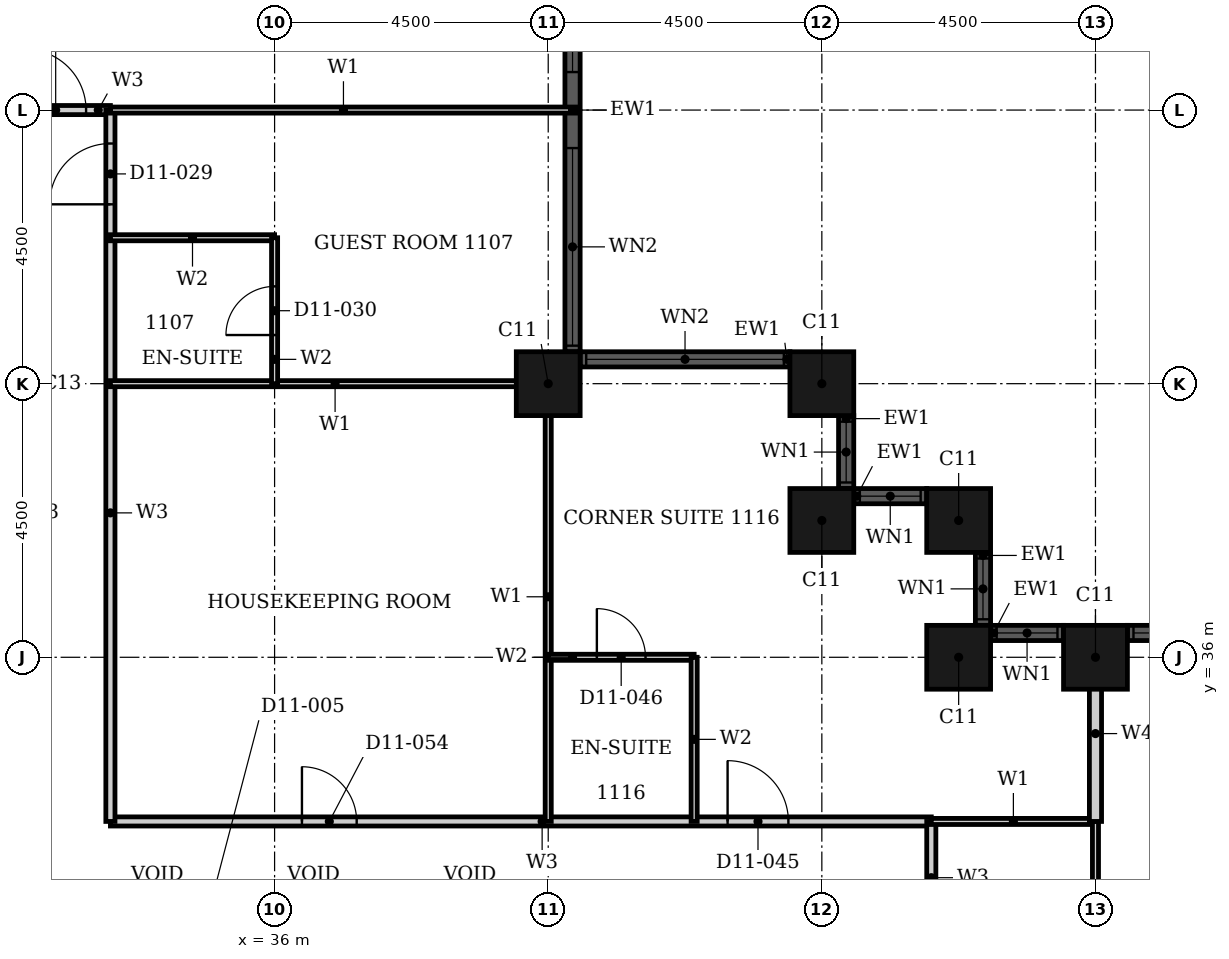
"""IFC4 building model, lengths in metres.
Left out: names, types, materials, properties, quantities, classifications, styles, units other than length and angle.
Written with IfcOpenShell. Run it as: python <this file> out.ifc"""

import sys

from ifc_helpers import new_model, si_unit, direction, frame, frame_2d, origin, origin_2d, place, context, subcontext, project, spatial, rectangle, hollow_rectangle, extrude, element, fill, save


model = new_model("IFC4")
c1 = context("Model", 3, precision=1e-05, world=origin(), true_north=direction((0.0, 1.0)))
c2 = subcontext(c1, "Body", "Model", "MODEL_VIEW")
j1 = project(units=[si_unit("LENGTHUNIT", "METRE"), si_unit("PLANEANGLEUNIT", "RADIAN")], contexts=[c1])
p1 = place(None, origin())
s1 = spatial("IfcSite", under=j1, at=p1, CompositionType="ELEMENT")
p2 = place(p1, origin())
s2 = spatial("IfcBuilding", under=s1, at=p2, CompositionType="ELEMENT")
p3 = place(p2, frame((0.0, 0.0, 52.8)))
s3 = spatial("IfcBuildingStorey", under=s2, at=p3, CompositionType="ELEMENT", Elevation=52.8)
for number, where, z_axis, x_axis in (
    (1, (49.5, 36.0, 0.0), (0.0, 0.0, 1.0), (1.0, 0.0, 0.0)),
    (2, (47.25, 36.0, 0.0), (0.0, 0.0, 1.0), (1.0, 0.0, 0.0)),
    (3, (47.25, 38.25, 0.0), (0.0, 0.0, 1.0), (1.0, 0.0, 0.0)),
    (4, (45.0, 38.25, 0.0), (0.0, 0.0, 1.0), (1.0, 0.0, 0.0)),
    (5, (45.0, 40.5, 0.0), (0.0, 0.0, 1.0), (1.0, 0.0, 0.0)),
    (6, (40.5, 40.5, 0.0), (0.0, 0.0, 1.0), (1.0, 0.0, 0.0)),
):
    element("IfcColumn", number, at=place(p3, frame(where, z_axis=z_axis, x_axis=x_axis)), inside=s3, PredefinedType="COLUMN", context=c2, shape_type="SweptSolid", body=[
        extrude(hollow_rectangle(XDim=1.05, YDim=1.05, WallThickness=0.034, at=origin_2d()), origin(), (0.0, 0.0, 1.0), 3.6),
    ])
p4 = place(p3, frame((57.975, 36.4, 0.0), z_axis=(0.0, 0.0, 1.0), x_axis=(-1.0, 0.0, 0.0)))
e7 = element("IfcWall", 7, at=p4, inside=s3, PredefinedType="SOLIDWALL", context=c2, shape_type="SweptSolid", body=[
    extrude(rectangle(XDim=7.95, YDim=0.25, at=frame_2d((3.975, 0.0))), origin(), (0.0, 0.0, 1.0), 3.6),
])
p5 = place(p4, frame((0.1, 0.0, 0.9)))
e8 = element("IfcOpeningElement", 8, at=p5, cuts=e7, PredefinedType="OPENING", context=c2, shape_type="SweptSolid", body=[
    extrude(rectangle(XDim=3.25, YDim=2.08, at=frame_2d((1.625, 1.04))), frame((0.0, 0.135, 0.0), z_axis=(0.0, -1.0, 0.0), x_axis=(1.0, 0.0, 0.0)), (0.0, 0.0, 1.0), 0.27),
])
p6 = place(p4, frame((4.6, 0.0, 0.9)))
e9 = element("IfcOpeningElement", 9, at=p6, cuts=e7, PredefinedType="OPENING", context=c2, shape_type="SweptSolid", body=[
    extrude(rectangle(XDim=3.25, YDim=2.08, at=frame_2d((1.625, 1.04))), frame((0.0, 0.135, 0.0), z_axis=(0.0, -1.0, 0.0), x_axis=(1.0, 0.0, 0.0)), (0.0, 0.0, 1.0), 0.27),
])
p7 = place(p3, frame((48.975, 36.4, 0.0), z_axis=(0.0, 0.0, 1.0), x_axis=(-1.0, 0.0, 0.0)))
e10 = element("IfcWall", 10, at=p7, inside=s3, PredefinedType="SOLIDWALL", context=c2, shape_type="SweptSolid", body=[
    extrude(rectangle(XDim=1.2, YDim=0.25, at=frame_2d((0.6, 0.0))), origin(), (0.0, 0.0, 1.0), 3.6),
])
p8 = place(p7, frame((0.1, 0.0, 0.9)))
e11 = element("IfcOpeningElement", 11, at=p8, cuts=e10, PredefinedType="OPENING", context=c2, shape_type="SweptSolid", body=[
    extrude(rectangle(XDim=1.0, YDim=2.08, at=frame_2d((0.5, 1.04))), frame((0.0, 0.135, 0.0), z_axis=(0.0, -1.0, 0.0), x_axis=(1.0, 0.0, 0.0)), (0.0, 0.0, 1.0), 0.27),
])
p9 = place(p3, frame((47.65, 36.525, 0.0), z_axis=(0.0, 0.0, 1.0), x_axis=(0.0, 1.0, 0.0)))
e12 = element("IfcWall", 12, at=p9, inside=s3, PredefinedType="SOLIDWALL", context=c2, shape_type="SweptSolid", body=[
    extrude(rectangle(XDim=1.2, YDim=0.25, at=frame_2d((0.6, 0.0))), origin(), (0.0, 0.0, 1.0), 3.6),
])
p10 = place(p9, frame((0.1, 0.0, 0.9)))
e13 = element("IfcOpeningElement", 13, at=p10, cuts=e12, PredefinedType="OPENING", context=c2, shape_type="SweptSolid", body=[
    extrude(rectangle(XDim=1.0, YDim=2.08, at=frame_2d((0.5, 1.04))), frame((0.0, 0.135, 0.0), z_axis=(0.0, -1.0, 0.0), x_axis=(1.0, 0.0, 0.0)), (0.0, 0.0, 1.0), 0.27),
])
p11 = place(p3, frame((46.725, 38.65, 0.0), z_axis=(0.0, 0.0, 1.0), x_axis=(-1.0, 0.0, 0.0)))
e14 = element("IfcWall", 14, at=p11, inside=s3, PredefinedType="SOLIDWALL", context=c2, shape_type="SweptSolid", body=[
    extrude(rectangle(XDim=1.2, YDim=0.25, at=frame_2d((0.6, 0.0))), origin(), (0.0, 0.0, 1.0), 3.6),
])
p12 = place(p11, frame((0.1, 0.0, 0.9)))
e15 = element("IfcOpeningElement", 15, at=p12, cuts=e14, PredefinedType="OPENING", context=c2, shape_type="SweptSolid", body=[
    extrude(rectangle(XDim=1.0, YDim=2.08, at=frame_2d((0.5, 1.04))), frame((0.0, 0.135, 0.0), z_axis=(0.0, -1.0, 0.0), x_axis=(1.0, 0.0, 0.0)), (0.0, 0.0, 1.0), 0.27),
])
p13 = place(p3, frame((45.4, 38.775, 0.0), z_axis=(0.0, 0.0, 1.0), x_axis=(0.0, 1.0, 0.0)))
e16 = element("IfcWall", 16, at=p13, inside=s3, PredefinedType="SOLIDWALL", context=c2, shape_type="SweptSolid", body=[
    extrude(rectangle(XDim=1.2, YDim=0.25, at=frame_2d((0.6, 0.0))), origin(), (0.0, 0.0, 1.0), 3.6),
])
p14 = place(p13, frame((0.1, 0.0, 0.9)))
e17 = element("IfcOpeningElement", 17, at=p14, cuts=e16, PredefinedType="OPENING", context=c2, shape_type="SweptSolid", body=[
    extrude(rectangle(XDim=1.0, YDim=2.08, at=frame_2d((0.5, 1.04))), frame((0.0, 0.135, 0.0), z_axis=(0.0, -1.0, 0.0), x_axis=(1.0, 0.0, 0.0)), (0.0, 0.0, 1.0), 0.27),
])
p15 = place(p3, frame((44.475, 40.9, 0.0), z_axis=(0.0, 0.0, 1.0), x_axis=(-1.0, 0.0, 0.0)))
e18 = element("IfcWall", 18, at=p15, inside=s3, PredefinedType="SOLIDWALL", context=c2, shape_type="SweptSolid", body=[
    extrude(rectangle(XDim=3.45, YDim=0.25, at=frame_2d((1.725, 0.0))), origin(), (0.0, 0.0, 1.0), 3.6),
])
p16 = place(p15, frame((0.1, 0.0, 0.9)))
e19 = element("IfcOpeningElement", 19, at=p16, cuts=e18, PredefinedType="OPENING", context=c2, shape_type="SweptSolid", body=[
    extrude(rectangle(XDim=3.25, YDim=2.08, at=frame_2d((1.625, 1.04))), frame((0.0, 0.135, 0.0), z_axis=(0.0, -1.0, 0.0), x_axis=(1.0, 0.0, 0.0)), (0.0, 0.0, 1.0), 0.27),
])
p17 = place(p3, frame((40.9, 41.025, 0.0), z_axis=(0.0, 0.0, 1.0), x_axis=(0.0, 1.0, 0.0)))
e20 = element("IfcWall", 20, at=p17, inside=s3, PredefinedType="SOLIDWALL", context=c2, shape_type="SweptSolid", body=[
    extrude(rectangle(XDim=7.95, YDim=0.25, at=frame_2d((3.975, 0.0))), origin(), (0.0, 0.0, 1.0), 3.6),
])
p18 = place(p17, frame((0.1, 0.0, 0.9)))
e21 = element("IfcOpeningElement", 21, at=p18, cuts=e20, PredefinedType="OPENING", context=c2, shape_type="SweptSolid", body=[
    extrude(rectangle(XDim=3.25, YDim=2.08, at=frame_2d((1.625, 1.04))), frame((0.0, 0.135, 0.0), z_axis=(0.0, -1.0, 0.0), x_axis=(1.0, 0.0, 0.0)), (0.0, 0.0, 1.0), 0.27),
])
p19 = place(p17, frame((4.6, 0.0, 0.9)))
e22 = element("IfcOpeningElement", 22, at=p19, cuts=e20, PredefinedType="OPENING", context=c2, shape_type="SweptSolid", body=[
    extrude(rectangle(XDim=3.25, YDim=2.08, at=frame_2d((1.625, 1.04))), frame((0.0, 0.135, 0.0), z_axis=(0.0, -1.0, 0.0), x_axis=(1.0, 0.0, 0.0)), (0.0, 0.0, 1.0), 0.27),
])
p20 = place(p3, frame((33.3, 33.3, 0.0), z_axis=(0.0, 0.0, 1.0), x_axis=(1.0, 0.0, 0.0)))
e23 = element("IfcWall", 23, at=p20, inside=s3, PredefinedType="PARTITIONING", context=c2, shape_type="SweptSolid", body=[
    extrude(rectangle(XDim=13.5, YDim=0.15, at=frame_2d((6.75, 0.0))), origin(), (0.0, 0.0, 1.0), 3.3),
])
p21 = place(p20, frame((10.15, 0.0, 0.0)))
e24 = element("IfcOpeningElement", 24, at=p21, cuts=e23, PredefinedType="OPENING", context=c2, shape_type="SweptSolid", body=[
    extrude(rectangle(XDim=1.0, YDim=2.1, at=frame_2d((0.5, 1.05))), frame((0.0, 0.085, 0.0), z_axis=(0.0, -1.0, 0.0), x_axis=(1.0, 0.0, 0.0)), (0.0, 0.0, 1.0), 0.17),
])
p22 = place(p20, frame((3.15, 0.0, 0.0)))
e25 = element("IfcOpeningElement", 25, at=p22, cuts=e23, PredefinedType="OPENING", context=c2, shape_type="SweptSolid", body=[
    extrude(rectangle(XDim=0.9, YDim=2.1, at=frame_2d((0.45, 1.05))), frame((0.0, 0.085, 0.0), z_axis=(0.0, -1.0, 0.0), x_axis=(1.0, 0.0, 0.0)), (0.0, 0.0, 1.0), 0.17),
])
p23 = place(p3, frame((31.5, 45.0, 0.0), z_axis=(0.0, 0.0, 1.0), x_axis=(1.0, 0.0, 0.0)))
e26 = element("IfcWall", 26, at=p23, inside=s3, PredefinedType="PARTITIONING", context=c2, shape_type="SweptSolid", body=[
    extrude(rectangle(XDim=1.8, YDim=0.15, at=frame_2d((0.9, 0.0))), origin(), (0.0, 0.0, 1.0), 3.3),
])
p24 = place(p23, frame((0.4, 0.0, 0.0)))
e27 = element("IfcOpeningElement", 27, at=p24, cuts=e26, PredefinedType="OPENING", context=c2, shape_type="SweptSolid", body=[
    extrude(rectangle(XDim=1.0, YDim=2.1, at=frame_2d((0.5, 1.05))), frame((0.0, 0.085, 0.0), z_axis=(0.0, -1.0, 0.0), x_axis=(1.0, 0.0, 0.0)), (0.0, 0.0, 1.0), 0.17),
])
p25 = place(p3, frame((33.3, 33.3, 0.0), z_axis=(0.0, 0.0, 1.0), x_axis=(0.0, 1.0, 0.0)))
e28 = element("IfcWall", 28, at=p25, inside=s3, PredefinedType="PARTITIONING", context=c2, shape_type="SweptSolid", body=[
    extrude(rectangle(XDim=11.7, YDim=0.15, at=frame_2d((5.85, 0.0))), origin(), (0.0, 0.0, 1.0), 3.3),
])
p26 = place(p25, frame((10.15, 0.0, 0.0)))
e29 = element("IfcOpeningElement", 29, at=p26, cuts=e28, PredefinedType="OPENING", context=c2, shape_type="SweptSolid", body=[
    extrude(rectangle(XDim=1.0, YDim=2.1, at=frame_2d((0.5, 1.05))), frame((0.0, 0.085, 0.0), z_axis=(0.0, -1.0, 0.0), x_axis=(1.0, 0.0, 0.0)), (0.0, 0.0, 1.0), 0.17),
])
p27 = place(p3, frame((46.8, 28.8, 0.0), z_axis=(0.0, 0.0, 1.0), x_axis=(0.0, 1.0, 0.0)))
e30 = element("IfcWall", 30, at=p27, inside=s3, PredefinedType="PARTITIONING", context=c2, shape_type="SweptSolid", body=[
    extrude(rectangle(XDim=4.5, YDim=0.15, at=frame_2d((2.25, 0.0))), origin(), (0.0, 0.0, 1.0), 3.3),
])
p28 = place(p27, frame((1.75, 0.0, 0.0)))
e31 = element("IfcOpeningElement", 31, at=p28, cuts=e30, PredefinedType="OPENING", context=c2, shape_type="SweptSolid", body=[
    extrude(rectangle(XDim=0.9, YDim=2.1, at=frame_2d((0.45, 1.05))), frame((0.0, 0.085, 0.0), z_axis=(0.0, -1.0, 0.0), x_axis=(1.0, 0.0, 0.0)), (0.0, 0.0, 1.0), 0.17),
])
p29 = place(p3, frame((46.8, 33.3, 0.0), z_axis=(0.0, 0.0, 1.0), x_axis=(1.0, 0.0, 0.0)))
e32 = element("IfcWall", 32, at=p29, inside=s3, PredefinedType="PARTITIONING", context=c2, shape_type="SweptSolid", body=[
    extrude(rectangle(XDim=2.7, YDim=0.1, at=frame_2d((1.35, 0.0))), origin(), (0.0, 0.0, 1.0), 3.3),
])
p30 = place(p3, frame((33.3, 40.5, 0.0), z_axis=(0.0, 0.0, 1.0), x_axis=(1.0, 0.0, 0.0)))
e33 = element("IfcWall", 33, at=p30, inside=s3, PredefinedType="PARTITIONING", context=c2, shape_type="SweptSolid", body=[
    extrude(rectangle(XDim=7.39, YDim=0.1, at=frame_2d((3.695, 0.0))), origin(), (0.0, 0.0, 1.0), 2.38),
])
p31 = place(p3, frame((33.3, 45.0, 0.0), z_axis=(0.0, 0.0, 1.0), x_axis=(1.0, 0.0, 0.0)))
e34 = element("IfcWall", 34, at=p31, inside=s3, PredefinedType="PARTITIONING", context=c2, shape_type="SweptSolid", body=[
    extrude(rectangle(XDim=7.665, YDim=0.1, at=frame_2d((3.833, 0.0))), origin(), (0.0, 0.0, 1.0), 3.3),
])
p32 = place(p3, frame((40.5, 33.3, 0.0), z_axis=(0.0, 0.0, 1.0), x_axis=(0.0, 1.0, 0.0)))
e35 = element("IfcWall", 35, at=p32, inside=s3, PredefinedType="PARTITIONING", context=c2, shape_type="SweptSolid", body=[
    extrude(rectangle(XDim=7.39, YDim=0.1, at=frame_2d((3.695, 0.0))), origin(), (0.0, 0.0, 1.0), 3.3),
])
p33 = place(p3, frame((49.5, 28.8, 0.0), z_axis=(0.0, 0.0, 1.0), x_axis=(0.0, 1.0, 0.0)))
e36 = element("IfcWall", 36, at=p33, inside=s3, PredefinedType="PARTITIONING", context=c2, shape_type="SweptSolid", body=[
    extrude(rectangle(XDim=4.5, YDim=0.1, at=frame_2d((2.25, 0.0))), origin(), (0.0, 0.0, 1.0), 2.38),
])
p34 = place(p3, frame((49.5, 33.3, 0.0), z_axis=(0.0, 0.0, 1.0), x_axis=(0.0, 1.0, 0.0)))
e37 = element("IfcWall", 37, at=p34, inside=s3, PredefinedType="PARTITIONING", context=c2, shape_type="SweptSolid", body=[
    extrude(rectangle(XDim=2.89, YDim=0.2, at=frame_2d((1.445, 0.0))), origin(), (0.0, 0.0, 1.0), 2.38),
])
p35 = place(p3, frame((40.5, 36.0, 0.0), z_axis=(0.0, 0.0, 1.0), x_axis=(1.0, 0.0, 0.0)))
e38 = element("IfcWall", 38, at=p35, inside=s3, PredefinedType="PARTITIONING", context=c2, shape_type="SweptSolid", body=[
    extrude(rectangle(XDim=2.4, YDim=0.1, at=frame_2d((1.2, 0.0))), origin(), (0.0, 0.0, 1.0), 3.3),
])
p36 = place(p35, frame((0.8, 0.0, 0.0)))
e39 = element("IfcOpeningElement", 39, at=p36, cuts=e38, PredefinedType="OPENING", context=c2, shape_type="SweptSolid", body=[
    extrude(rectangle(XDim=0.8, YDim=2.1, at=frame_2d((0.4, 1.05))), frame((0.0, 0.06, 0.0), z_axis=(0.0, -1.0, 0.0), x_axis=(1.0, 0.0, 0.0)), (0.0, 0.0, 1.0), 0.12),
])
p37 = place(p3, frame((33.3, 42.9, 0.0), z_axis=(0.0, 0.0, 1.0), x_axis=(1.0, 0.0, 0.0)))
e40 = element("IfcWall", 40, at=p37, inside=s3, PredefinedType="PARTITIONING", context=c2, shape_type="SweptSolid", body=[
    extrude(rectangle(XDim=2.7, YDim=0.1, at=frame_2d((1.35, 0.0))), origin(), (0.0, 0.0, 1.0), 3.3),
])
p38 = place(p3, frame((36.0, 40.5, 0.0), z_axis=(0.0, 0.0, 1.0), x_axis=(0.0, 1.0, 0.0)))
e41 = element("IfcWall", 41, at=p38, inside=s3, PredefinedType="PARTITIONING", context=c2, shape_type="SweptSolid", body=[
    extrude(rectangle(XDim=2.4, YDim=0.1, at=frame_2d((1.2, 0.0))), origin(), (0.0, 0.0, 1.0), 2.58),
])
p39 = place(p38, frame((0.8, 0.0, 0.0)))
e42 = element("IfcOpeningElement", 42, at=p39, cuts=e41, PredefinedType="OPENING", context=c2, shape_type="SweptSolid", body=[
    extrude(rectangle(XDim=0.8, YDim=2.1, at=frame_2d((0.4, 1.05))), frame((0.0, 0.06, 0.0), z_axis=(0.0, -1.0, 0.0), x_axis=(1.0, 0.0, 0.0)), (0.0, 0.0, 1.0), 0.12),
])
p40 = place(p3, frame((42.9, 33.3, 0.0), z_axis=(0.0, 0.0, 1.0), x_axis=(0.0, 1.0, 0.0)))
e43 = element("IfcWall", 43, at=p40, inside=s3, PredefinedType="PARTITIONING", context=c2, shape_type="SweptSolid", body=[
    extrude(rectangle(XDim=2.7, YDim=0.1, at=frame_2d((1.35, 0.0))), origin(), (0.0, 0.0, 1.0), 3.3),
])
p41 = place(p6, origin())
e44 = element("IfcWindow", 44, at=p41, inside=s3, PartitioningType="SINGLE_PANEL", PredefinedType="WINDOW", context=c2, shape_type="SweptSolid", body=[
    extrude(rectangle(XDim=3.25, YDim=2.08, at=frame_2d((1.625, 1.04))), frame((0.0, 0.03, 0.0), z_axis=(0.0, -1.0, 0.0), x_axis=(1.0, 0.0, 0.0)), (0.0, 0.0, 1.0), 0.06),
])
fill(e9, e44)
p42 = place(p8, origin())
e45 = element("IfcWindow", 45, at=p42, inside=s3, PartitioningType="SINGLE_PANEL", PredefinedType="WINDOW", context=c2, shape_type="SweptSolid", body=[
    extrude(rectangle(XDim=1.0, YDim=2.08, at=frame_2d((0.5, 1.04))), frame((0.0, 0.03, 0.0), z_axis=(0.0, -1.0, 0.0), x_axis=(1.0, 0.0, 0.0)), (0.0, 0.0, 1.0), 0.06),
])
fill(e11, e45)
p43 = place(p10, origin())
e46 = element("IfcWindow", 46, at=p43, inside=s3, PartitioningType="SINGLE_PANEL", PredefinedType="WINDOW", context=c2, shape_type="SweptSolid", body=[
    extrude(rectangle(XDim=1.0, YDim=2.08, at=frame_2d((0.5, 1.04))), frame((0.0, 0.03, 0.0), z_axis=(0.0, -1.0, 0.0), x_axis=(1.0, 0.0, 0.0)), (0.0, 0.0, 1.0), 0.06),
])
fill(e13, e46)
p44 = place(p12, origin())
e47 = element("IfcWindow", 47, at=p44, inside=s3, PartitioningType="SINGLE_PANEL", PredefinedType="WINDOW", context=c2, shape_type="SweptSolid", body=[
    extrude(rectangle(XDim=1.0, YDim=2.08, at=frame_2d((0.5, 1.04))), frame((0.0, 0.03, 0.0), z_axis=(0.0, -1.0, 0.0), x_axis=(1.0, 0.0, 0.0)), (0.0, 0.0, 1.0), 0.06),
])
fill(e15, e47)
p45 = place(p14, origin())
e48 = element("IfcWindow", 48, at=p45, inside=s3, PartitioningType="SINGLE_PANEL", PredefinedType="WINDOW", context=c2, shape_type="SweptSolid", body=[
    extrude(rectangle(XDim=1.0, YDim=2.08, at=frame_2d((0.5, 1.04))), frame((0.0, 0.03, 0.0), z_axis=(0.0, -1.0, 0.0), x_axis=(1.0, 0.0, 0.0)), (0.0, 0.0, 1.0), 0.06),
])
fill(e17, e48)
p46 = place(p16, origin())
e49 = element("IfcWindow", 49, at=p46, inside=s3, PartitioningType="SINGLE_PANEL", PredefinedType="WINDOW", context=c2, shape_type="SweptSolid", body=[
    extrude(rectangle(XDim=3.25, YDim=2.08, at=frame_2d((1.625, 1.04))), frame((0.0, 0.03, 0.0), z_axis=(0.0, -1.0, 0.0), x_axis=(1.0, 0.0, 0.0)), (0.0, 0.0, 1.0), 0.06),
])
fill(e19, e49)
p47 = place(p18, origin())
e50 = element("IfcWindow", 50, at=p47, inside=s3, PartitioningType="SINGLE_PANEL", PredefinedType="WINDOW", context=c2, shape_type="SweptSolid", body=[
    extrude(rectangle(XDim=3.25, YDim=2.08, at=frame_2d((1.625, 1.04))), frame((0.0, 0.03, 0.0), z_axis=(0.0, -1.0, 0.0), x_axis=(1.0, 0.0, 0.0)), (0.0, 0.0, 1.0), 0.06),
])
fill(e21, e50)
p48 = place(p19, origin())
e51 = element("IfcWindow", 51, at=p48, inside=s3, PartitioningType="SINGLE_PANEL", PredefinedType="WINDOW", context=c2, shape_type="SweptSolid", body=[
    extrude(rectangle(XDim=3.25, YDim=2.08, at=frame_2d((1.625, 1.04))), frame((0.0, 0.03, 0.0), z_axis=(0.0, -1.0, 0.0), x_axis=(1.0, 0.0, 0.0)), (0.0, 0.0, 1.0), 0.06),
])
fill(e22, e51)
p49 = place(p26, origin())
e52 = element("IfcDoor", 52, at=p49, inside=s3, OperationType="SINGLE_SWING_RIGHT", PredefinedType="DOOR", context=c2, shape_type="SweptSolid", body=[
    extrude(rectangle(XDim=1.0, YDim=2.1, at=frame_2d((0.5, 1.05))), frame((0.0, 0.025, 0.0), z_axis=(0.0, -1.0, 0.0), x_axis=(1.0, 0.0, 0.0)), (0.0, 0.0, 1.0), 0.05),
])
fill(e29, e52)
p50 = place(p39, origin())
e53 = element("IfcDoor", 53, at=p50, inside=s3, OperationType="SINGLE_SWING_LEFT", PredefinedType="DOOR", context=c2, shape_type="SweptSolid", body=[
    extrude(rectangle(XDim=0.8, YDim=2.1, at=frame_2d((0.4, 1.05))), frame((0.0, 0.025, 0.0), z_axis=(0.0, -1.0, 0.0), x_axis=(1.0, 0.0, 0.0)), (0.0, 0.0, 1.0), 0.05),
])
fill(e42, e53)
p51 = place(p24, origin())
e54 = element("IfcDoor", 54, at=p51, inside=s3, OperationType="SINGLE_SWING_RIGHT", PredefinedType="DOOR", context=c2, shape_type="SweptSolid", body=[
    extrude(rectangle(XDim=1.0, YDim=2.1, at=frame_2d((0.5, 1.05))), frame((0.0, 0.025, 0.0), z_axis=(0.0, -1.0, 0.0), x_axis=(1.0, 0.0, 0.0)), (0.0, 0.0, 1.0), 0.05),
])
fill(e27, e54)
p52 = place(p21, origin())
e55 = element("IfcDoor", 55, at=p52, inside=s3, OperationType="SINGLE_SWING_RIGHT", PredefinedType="DOOR", context=c2, shape_type="SweptSolid", body=[
    extrude(rectangle(XDim=1.0, YDim=2.1, at=frame_2d((0.5, 1.05))), frame((0.0, 0.025, 0.0), z_axis=(0.0, -1.0, 0.0), x_axis=(1.0, 0.0, 0.0)), (0.0, 0.0, 1.0), 0.05),
])
fill(e24, e55)
p53 = place(p36, origin())
e56 = element("IfcDoor", 56, at=p53, inside=s3, OperationType="SINGLE_SWING_RIGHT", PredefinedType="DOOR", context=c2, shape_type="SweptSolid", body=[
    extrude(rectangle(XDim=0.8, YDim=2.1, at=frame_2d((0.4, 1.05))), frame((0.0, 0.025, 0.0), z_axis=(0.0, -1.0, 0.0), x_axis=(1.0, 0.0, 0.0)), (0.0, 0.0, 1.0), 0.05),
])
fill(e39, e56)
p54 = place(p22, origin())
e57 = element("IfcDoor", 57, at=p54, inside=s3, OperationType="SINGLE_SWING_LEFT", PredefinedType="DOOR", context=c2, shape_type="SweptSolid", body=[
    extrude(rectangle(XDim=0.9, YDim=2.1, at=frame_2d((0.45, 1.05))), frame((0.0, 0.025, 0.0), z_axis=(0.0, -1.0, 0.0), x_axis=(1.0, 0.0, 0.0)), (0.0, 0.0, 1.0), 0.05),
])
fill(e25, e57)
save(model, sys.argv[1])
